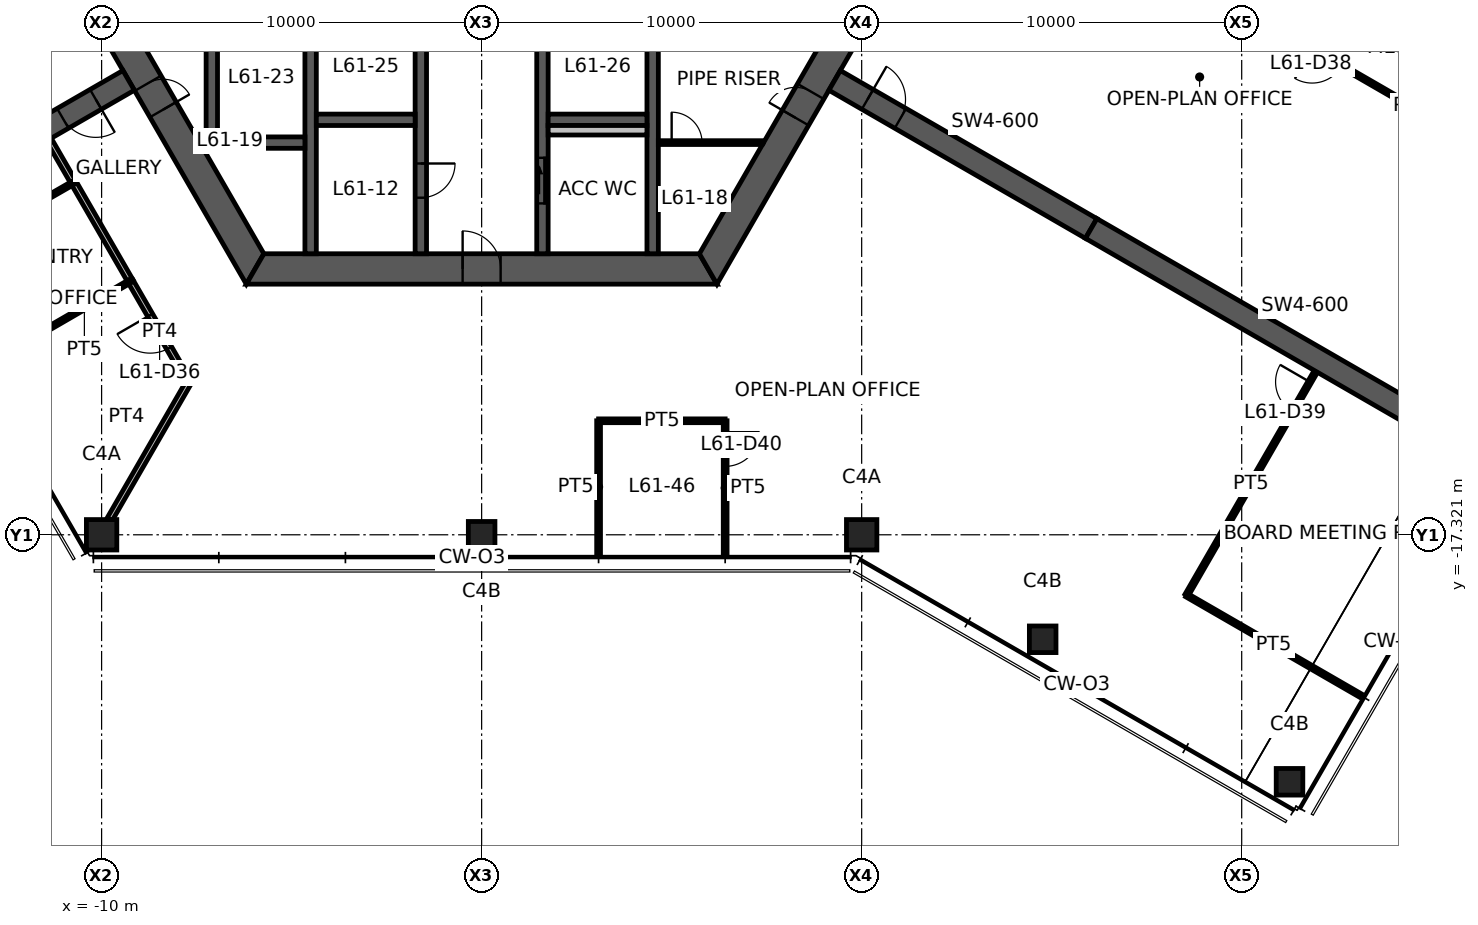
"""IFC4 building model, lengths in metres.
Left out: names, types, materials, properties, quantities, classifications, styles, units other than length and angle.
Written with IfcOpenShell. Run it as: python <this file> out.ifc"""

import sys

from ifc_helpers import new_model, si_unit, direction, frame, frame_2d, origin, origin_2d, place, context, subcontext, project, spatial, polyline, rectangle, hollow_rectangle, outline, extrude, element, fill, save


model = new_model("IFC4")
c1 = context("Model", 3, precision=1e-05, world=origin(), true_north=direction((0.0, 1.0)))
c2 = subcontext(c1, "Body", "Model", "MODEL_VIEW")
j1 = project(units=[si_unit("LENGTHUNIT", "METRE"), si_unit("PLANEANGLEUNIT", "RADIAN")], contexts=[c1])
p1 = place(None, origin())
s1 = spatial("IfcSite", under=j1, at=p1, CompositionType="ELEMENT")
p2 = place(p1, origin())
s2 = spatial("IfcBuilding", under=s1, at=p2, CompositionType="ELEMENT")
p3 = place(p2, frame((0.0, 0.0, 244.0)))
s3 = spatial("IfcBuildingStorey", under=s2, at=p3, CompositionType="ELEMENT", Elevation=244.0)
for number, where, z_axis, x_axis in (
    (1, (-10.0, -17.321, 0.0), (0.0, 0.0, 1.0), (1.0, 0.0, 0.0)),
    (2, (10.0, -17.321, 0.0), (0.0, 0.0, 1.0), (1.0, 0.0, 0.0)),
):
    element("IfcColumn", number, at=place(p3, frame(where, z_axis=z_axis, x_axis=x_axis)), inside=s3, PredefinedType="COLUMN", context=c2, shape_type="SweptSolid", body=[
        extrude(hollow_rectangle(XDim=0.8, YDim=0.8, WallThickness=0.04, at=origin_2d()), origin(), (0.0, 0.0, 1.0), 3.9),
    ])
for number, where, z_axis, x_axis in (
    (3, (0.0, -17.321, 0.0), (0.0, 0.0, 1.0), (1.0, 0.0, 0.0)),
    (4, (14.763, -20.071, 0.0), (0.0, 0.0, 1.0), (1.0, 0.0, 0.0)),
    (5, (21.258, -23.821, 0.0), (0.0, 0.0, 1.0), (1.0, 0.0, 0.0)),
):
    element("IfcColumn", number, at=place(p3, frame(where, z_axis=z_axis, x_axis=x_axis)), inside=s3, PredefinedType="COLUMN", context=c2, shape_type="SweptSolid", body=[
        extrude(hollow_rectangle(XDim=0.7, YDim=0.7, WallThickness=0.032, at=origin_2d()), origin(), (0.0, 0.0, 1.0), 3.9),
    ])
p4 = place(p3, frame((-11.922, 0.0, 0.0), z_axis=(0.0, 0.0, 1.0), x_axis=(0.500004296715, -0.866022923061, 0.0)))
e6 = element("IfcWall", 6, at=p4, inside=s3, PredefinedType="SHEAR", context=c2, shape_type="SweptSolid", body=[
    extrude(outline(polyline([(-0.231, -0.4), (6.281, -0.4), (7.081, -0.4), (12.153, -0.4), (11.691, 0.4), (7.081, 0.4), (6.281, 0.4), (0.231, 0.4), (-0.231, -0.4)])), origin(), (0.0, 0.0, 1.0), 3.9),
])
p5 = place(p4, frame((6.281, 0.0, 0.0)))
e7 = element("IfcOpeningElement", 7, at=p5, cuts=e6, PredefinedType="OPENING", context=c2, shape_type="SweptSolid", body=[
    extrude(rectangle(XDim=0.8, YDim=2.1, at=frame_2d((0.4, 1.05))), frame((0.0, 0.41, 0.0), z_axis=(0.0, -1.0, 0.0), x_axis=(1.0, 0.0, 0.0)), (0.0, 0.0, 1.0), 0.82),
])
p6 = place(p3, frame((-5.961, -10.325, 0.0), z_axis=(0.0, 0.0, 1.0), x_axis=(1.0, 0.0, 0.0)))
e8 = element("IfcWall", 8, at=p6, inside=s3, PredefinedType="SHEAR", context=c2, shape_type="SweptSolid", body=[
    extrude(outline(polyline([(-0.231, -0.4), (5.461, -0.4), (6.461, -0.4), (12.153, -0.4), (11.691, 0.4), (6.461, 0.4), (5.461, 0.4), (0.231, 0.4), (-0.231, -0.4)])), origin(), (0.0, 0.0, 1.0), 3.9),
])
p7 = place(p6, frame((5.461, 0.0, 0.0)))
e9 = element("IfcOpeningElement", 9, at=p7, cuts=e8, PredefinedType="OPENING", context=c2, shape_type="SweptSolid", body=[
    extrude(rectangle(XDim=1.0, YDim=2.1, at=frame_2d((0.5, 1.05))), frame((0.0, 0.41, 0.0), z_axis=(0.0, -1.0, 0.0), x_axis=(1.0, 0.0, 0.0)), (0.0, 0.0, 1.0), 0.82),
])
p8 = place(p3, frame((5.961, -10.325, 0.0), z_axis=(0.0, 0.0, 1.0), x_axis=(0.500004296715, 0.866022923061, 0.0)))
e10 = element("IfcWall", 10, at=p8, inside=s3, PredefinedType="SHEAR", context=c2, shape_type="SweptSolid", body=[
    extrude(outline(polyline([(-0.231, -0.4), (4.594, -0.4), (5.394, -0.4), (12.153, -0.4), (11.691, 0.4), (5.394, 0.4), (4.594, 0.4), (0.231, 0.4), (-0.231, -0.4)])), origin(), (0.0, 0.0, 1.0), 3.9),
])
p9 = place(p8, frame((4.594, 0.0, 0.0)))
e11 = element("IfcOpeningElement", 11, at=p9, cuts=e10, PredefinedType="OPENING", context=c2, shape_type="SweptSolid", body=[
    extrude(rectangle(XDim=0.8, YDim=2.1, at=frame_2d((0.4, 1.05))), frame((0.0, 0.41, 0.0), z_axis=(0.0, -1.0, 0.0), x_axis=(1.0, 0.0, 0.0)), (0.0, 0.0, 1.0), 0.82),
])
p10 = place(p3, frame((-9.288, -5.363, 0.0), z_axis=(0.0, 0.0, 1.0), x_axis=(-0.866027473358, -0.499996415376, 0.0)))
e12 = element("IfcWall", 12, at=p10, inside=s3, PredefinedType="SHEAR", context=c2, shape_type="SweptSolid", body=[
    extrude(rectangle(XDim=7.045, YDim=0.6, at=frame_2d((3.523, 0.0))), origin(), (0.0, 0.0, 1.0), 3.9),
])
p11 = place(p10, frame((1.0, 0.0, 0.0)))
e13 = element("IfcOpeningElement", 13, at=p11, cuts=e12, PredefinedType="OPENING", context=c2, shape_type="SweptSolid", body=[
    extrude(rectangle(XDim=1.0, YDim=2.1, at=frame_2d((0.5, 1.05))), frame((0.0, 0.31, 0.0), z_axis=(0.0, -1.0, 0.0), x_axis=(1.0, 0.0, 0.0)), (0.0, 0.0, 1.0), 0.62),
])
p12 = place(p3, frame((9.288, -5.363, 0.0), z_axis=(0.0, 0.0, 1.0), x_axis=(0.866031736626, -0.499989031036, 0.0)))
e14 = element("IfcWall", 14, at=p12, inside=s3, PredefinedType="SHEAR", context=c2, shape_type="SweptSolid", body=[
    extrude(rectangle(XDim=7.796, YDim=0.6, at=frame_2d((3.898, 0.0))), origin(), (0.0, 0.0, 1.0), 3.9),
])
p13 = place(p12, frame((1.0, 0.0, 0.0)))
e15 = element("IfcOpeningElement", 15, at=p13, cuts=e14, PredefinedType="OPENING", context=c2, shape_type="SweptSolid", body=[
    extrude(rectangle(XDim=1.0, YDim=2.1, at=frame_2d((0.5, 1.05))), frame((0.0, 0.31, 0.0), z_axis=(0.0, -1.0, 0.0), x_axis=(1.0, 0.0, 0.0)), (0.0, 0.0, 1.0), 0.62),
])
p14 = place(p3, frame((16.039, -9.26, 0.0), z_axis=(0.0, 0.0, 1.0), x_axis=(0.866024837091, -0.50000098154, 0.0)))
e16 = element("IfcWall", 16, at=p14, inside=s3, PredefinedType="SHEAR", context=c2, shape_type="SweptSolid", body=[
    extrude(rectangle(XDim=13.0, YDim=0.6, at=frame_2d((6.5, 0.0))), origin(), (0.0, 0.0, 1.0), 3.9),
])
p15 = place(p3, frame((-1.6, -3.75, 0.0), z_axis=(0.0, 0.0, 1.0), x_axis=(0.0, -1.0, 0.0)))
e17 = element("IfcWall", 17, at=p15, inside=s3, PredefinedType="SHEAR", context=c2, shape_type="SweptSolid", body=[
    extrude(rectangle(XDim=6.175, YDim=0.3, at=frame_2d((3.087, 0.0))), origin(), (0.0, 0.0, 1.0), 3.9),
])
p16 = place(p15, frame((3.8, 0.0, 0.0)))
e18 = element("IfcOpeningElement", 18, at=p16, cuts=e17, PredefinedType="OPENING", context=c2, shape_type="SweptSolid", body=[
    extrude(rectangle(XDim=0.9, YDim=2.1, at=frame_2d((0.45, 1.05))), frame((0.0, 0.16, 0.0), z_axis=(0.0, -1.0, 0.0), x_axis=(1.0, 0.0, 0.0)), (0.0, 0.0, 1.0), 0.32),
])
p17 = place(p3, frame((1.6, -3.75, 0.0), z_axis=(0.0, 0.0, 1.0), x_axis=(0.0, -1.0, 0.0)))
e19 = element("IfcWall", 19, at=p17, inside=s3, PredefinedType="SHEAR", context=c2, shape_type="SweptSolid", body=[
    extrude(rectangle(XDim=6.175, YDim=0.3, at=frame_2d((3.087, 0.0))), origin(), (0.0, 0.0, 1.0), 3.9),
])
p18 = place(p17, frame((3.65, 0.0, 0.0)))
e20 = element("IfcOpeningElement", 20, at=p18, cuts=e19, PredefinedType="OPENING", context=c2, shape_type="SweptSolid", body=[
    extrude(rectangle(XDim=1.2, YDim=2.1, at=frame_2d((0.6, 1.05))), frame((0.0, 0.16, 0.0), z_axis=(0.0, -1.0, 0.0), x_axis=(1.0, 0.0, 0.0)), (0.0, 0.0, 1.0), 0.32),
])
for number, where, z_axis, x_axis in (
    (21, (-4.5, -3.75, 0.0), (0.0, 0.0, 1.0), (0.0, -1.0, 0.0)),
    (22, (4.5, -3.75, 0.0), (0.0, 0.0, 1.0), (0.0, -1.0, 0.0)),
):
    element("IfcWall", number, at=place(p3, frame(where, z_axis=z_axis, x_axis=x_axis)), inside=s3, PredefinedType="SHEAR", context=c2, shape_type="SweptSolid", body=[
        extrude(rectangle(XDim=6.175, YDim=0.3, at=frame_2d((3.087, 0.0))), origin(), (0.0, 0.0, 1.0), 3.9),
    ])
for number, where, z_axis, x_axis in (
    (23, (-4.35, -6.4, 0.0), (0.0, 0.0, 1.0), (1.0, 0.0, 0.0)),
    (24, (1.75, -6.4, 0.0), (0.0, 0.0, 1.0), (1.0, 0.0, 0.0)),
    (25, (-7.25, -7.0, 0.0), (0.0, 0.0, 1.0), (1.0, 0.0, 0.0)),
):
    element("IfcWall", number, at=place(p3, frame(where, z_axis=z_axis, x_axis=x_axis)), inside=s3, PredefinedType="SHEAR", context=c2, shape_type="SweptSolid", body=[
        extrude(rectangle(XDim=2.6, YDim=0.3, at=frame_2d((1.3, 0.0))), origin(), (0.0, 0.0, 1.0), 3.9),
    ])
p19 = place(p3, frame((-7.1, -3.75, 0.0), z_axis=(0.0, 0.0, 1.0), x_axis=(0.0, -1.0, 0.0)))
e26 = element("IfcWall", 26, at=p19, inside=s3, PredefinedType="SHEAR", context=c2, shape_type="SweptSolid", body=[
    extrude(rectangle(XDim=3.1, YDim=0.3, at=frame_2d((1.55, 0.0))), origin(), (0.0, 0.0, 1.0), 3.9),
])
p20 = place(p3, frame((1.75, -6.675, 0.0), z_axis=(0.0, 0.0, 1.0), x_axis=(1.0, 0.0, 0.0)))
e27 = element("IfcWall", 27, at=p20, inside=s3, PredefinedType="PLUMBINGWALL", context=c2, shape_type="SweptSolid", body=[
    extrude(rectangle(XDim=2.6, YDim=0.25, at=frame_2d((1.3, 0.0))), origin(), (0.0, 0.0, 1.0), 3.9),
])
p21 = place(p3, frame((4.65, -7.0, 0.0), z_axis=(0.0, 0.0, 1.0), x_axis=(1.0, 0.0, 0.0)))
e28 = element("IfcWall", 28, at=p21, inside=s3, PredefinedType="PARTITIONING", context=c2, shape_type="SweptSolid", body=[
    extrude(outline(polyline([(0.0, -0.05), (0.35, -0.05), (1.15, -0.05), (2.74, -0.05), (2.769, 0.0), (2.775, 0.05), (1.15, 0.05), (0.35, 0.05), (0.0, 0.05), (0.0, -0.05)])), origin(), (0.0, 0.0, 1.0), 2.95),
])
p22 = place(p21, frame((0.35, 0.0, 0.0)))
e29 = element("IfcOpeningElement", 29, at=p22, cuts=e28, PredefinedType="OPENING", context=c2, shape_type="SweptSolid", body=[
    extrude(rectangle(XDim=0.8, YDim=2.1, at=frame_2d((0.4, 1.05))), frame((0.0, 0.06, 0.0), z_axis=(0.0, -1.0, 0.0), x_axis=(1.0, 0.0, 0.0)), (0.0, 0.0, 1.0), 0.12),
])
p23 = place(p3, frame((-9.237, -10.65, 0.0), z_axis=(0.0, 0.0, 1.0), x_axis=(-0.499977562641, 0.866038357612, 0.0)))
e30 = element("IfcWall", 30, at=p23, inside=s3, PredefinedType="PARTITIONING", context=c2, shape_type="SweptSolid", body=[
    extrude(rectangle(XDim=3.01, YDim=0.15, at=frame_2d((1.505, 0.0))), origin(), (0.0, 0.0, 1.0), 2.95),
])
p24 = place(p3, frame((-10.738, -8.052, 0.0), z_axis=(0.0, 0.0, 1.0), x_axis=(-0.500084415177, 0.865976661173, 0.0)))
e31 = element("IfcWall", 31, at=p24, inside=s3, PredefinedType="PARTITIONING", context=c2, shape_type="SweptSolid", body=[
    extrude(rectangle(XDim=1.284, YDim=0.15, at=frame_2d((0.642, 0.0))), origin(), (0.0, 0.0, 1.0), 2.95),
])
p25 = place(p3, frame((-7.705, -13.305, 0.0), z_axis=(0.0, 0.0, 1.0), x_axis=(-0.500024891708, 0.866011032073, 0.0)))
e32 = element("IfcWall", 32, at=p25, inside=s3, PredefinedType="PARTITIONING", context=c2, shape_type="SweptSolid", body=[
    extrude(rectangle(XDim=3.074, YDim=0.15, at=frame_2d((1.537, 0.0))), origin(), (0.0, 0.0, 1.0), 2.95),
])
p26 = place(p25, frame((1.037, 0.0, 0.0)))
e33 = element("IfcOpeningElement", 33, at=p26, cuts=e32, PredefinedType="OPENING", context=c2, shape_type="SweptSolid", body=[
    extrude(rectangle(XDim=1.0, YDim=2.1, at=frame_2d((0.5, 1.05))), frame((0.0, 0.085, 0.0), z_axis=(0.0, -1.0, 0.0), x_axis=(1.0, 0.0, 0.0)), (0.0, 0.0, 1.0), 0.17),
])
for number, where, z_axis, x_axis in (
    (34, (-13.165, -9.448, 0.0), (0.0, 0.0, 1.0), (0.867, 0.499, 0.0)),
    (35, (-9.242, -10.642, 0.0), (0.0, 0.0, 1.0), (-0.865, -0.501, 0.0)),
):
    element("IfcWall", number, at=place(p3, frame(where, z_axis=z_axis, x_axis=x_axis)), inside=s3, PredefinedType="PARTITIONING", context=c2, shape_type="SweptSolid", body=[
        extrude(rectangle(XDim=2.8, YDim=0.1, at=frame_2d((1.4, 0.0))), origin(), (0.0, 0.0, 1.0), 2.95),
    ])
p27 = place(p3, frame((27.325, -7.693, 0.0), z_axis=(0.0, 0.0, 1.0), x_axis=(-0.866021597574, 0.500006592492, 0.0)))
e36 = element("IfcWall", 36, at=p27, inside=s3, PredefinedType="PARTITIONING", context=c2, shape_type="SweptSolid", body=[
    extrude(rectangle(XDim=6.62, YDim=0.1, at=frame_2d((3.31, 0.0))), origin(), (0.0, 0.0, 1.0), 2.95),
])
p28 = place(p27, frame((5.42, 0.0, 0.0)))
e37 = element("IfcOpeningElement", 37, at=p28, cuts=e36, PredefinedType="OPENING", context=c2, shape_type="SweptSolid", body=[
    extrude(rectangle(XDim=0.9, YDim=2.1, at=frame_2d((0.45, 1.05))), frame((0.0, 0.06, 0.0), z_axis=(0.0, -1.0, 0.0), x_axis=(1.0, 0.0, 0.0)), (0.0, 0.0, 1.0), 0.12),
])
p29 = place(p3, frame((18.552, -18.909, 0.0), z_axis=(0.0, 0.0, 1.0), x_axis=(0.499992600721, 0.866029675718, 0.0)))
e38 = element("IfcWall", 38, at=p29, inside=s3, PredefinedType="PARTITIONING", context=c2, shape_type="SweptSolid", body=[
    extrude(rectangle(XDim=6.78, YDim=0.1, at=frame_2d((3.39, 0.0))), origin(), (0.0, 0.0, 1.0), 2.95),
])
p30 = place(p29, frame((5.58, 0.0, 0.0)))
e39 = element("IfcOpeningElement", 39, at=p30, cuts=e38, PredefinedType="OPENING", context=c2, shape_type="SweptSolid", body=[
    extrude(rectangle(XDim=0.9, YDim=2.1, at=frame_2d((0.45, 1.05))), frame((0.0, 0.06, 0.0), z_axis=(0.0, -1.0, 0.0), x_axis=(1.0, 0.0, 0.0)), (0.0, 0.0, 1.0), 0.12),
])
p31 = place(p3, frame((23.124, -21.549, 0.0), z_axis=(0.0, 0.0, 1.0), x_axis=(-0.866009249374, 0.500027979216, 0.0)))
e40 = element("IfcWall", 40, at=p31, inside=s3, PredefinedType="PARTITIONING", context=c2, shape_type="SweptSolid", body=[
    extrude(rectangle(XDim=5.28, YDim=0.1, at=frame_2d((2.64, 0.0))), origin(), (0.0, 0.0, 1.0), 2.95),
])
p32 = place(p3, frame((3.077, -17.801, 0.0), z_axis=(0.0, 0.0, 1.0), x_axis=(0.0, 1.0, 0.0)))
e41 = element("IfcWall", 41, at=p32, inside=s3, PredefinedType="PARTITIONING", context=c2, shape_type="SweptSolid", body=[
    extrude(rectangle(XDim=3.48, YDim=0.1, at=frame_2d((1.74, 0.0))), origin(), (0.0, 0.0, 1.0), 2.95),
])
p33 = place(p3, frame((3.077, -14.321, 0.0), z_axis=(0.0, 0.0, 1.0), x_axis=(1.0, 0.0, 0.0)))
e42 = element("IfcWall", 42, at=p33, inside=s3, PredefinedType="PARTITIONING", context=c2, shape_type="SweptSolid", body=[
    extrude(rectangle(XDim=3.331, YDim=0.1, at=frame_2d((1.666, 0.0))), origin(), (0.0, 0.0, 1.0), 2.95),
])
p34 = place(p3, frame((6.408, -14.321, 0.0), z_axis=(0.0, 0.0, 1.0), x_axis=(0.0, -1.0, 0.0)))
e43 = element("IfcWall", 43, at=p34, inside=s3, PredefinedType="PARTITIONING", context=c2, shape_type="SweptSolid", body=[
    extrude(rectangle(XDim=3.535, YDim=0.1, at=frame_2d((1.768, 0.0))), origin(), (0.0, 0.0, 1.0), 2.95),
])
p35 = place(p34, frame((0.3, 0.0, 0.0)))
e44 = element("IfcOpeningElement", 44, at=p35, cuts=e43, PredefinedType="OPENING", context=c2, shape_type="SweptSolid", body=[
    extrude(rectangle(XDim=0.9, YDim=2.1, at=frame_2d((0.45, 1.05))), frame((0.0, 0.06, 0.0), z_axis=(0.0, -1.0, 0.0), x_axis=(1.0, 0.0, 0.0)), (0.0, 0.0, 1.0), 0.12),
])
p36 = place(p3, frame((-7.705, -13.305, 0.0), z_axis=(0.0, 0.0, 1.0), x_axis=(-0.500036655653, -0.866004239599, 0.0)))
e45 = element("IfcWall", 45, at=p36, inside=s3, PredefinedType="PARTITIONING", context=c2, shape_type="SweptSolid", body=[
    extrude(rectangle(XDim=4.17, YDim=0.15, at=frame_2d((2.085, 0.0))), origin(), (0.0, 0.0, 1.0), 2.95),
])
p37 = place(p7, origin())
e46 = element("IfcDoor", 46, at=p37, inside=s3, OperationType="SINGLE_SWING_LEFT", PredefinedType="DOOR", context=c2, shape_type="SweptSolid", body=[
    extrude(rectangle(XDim=1.0, YDim=2.1, at=frame_2d((0.5, 1.05))), frame((0.0, 0.025, 0.0), z_axis=(0.0, -1.0, 0.0), x_axis=(1.0, 0.0, 0.0)), (0.0, 0.0, 1.0), 0.05),
])
fill(e9, e46)
p38 = place(p9, origin())
e47 = element("IfcDoor", 47, at=p38, inside=s3, OperationType="SINGLE_SWING_LEFT", PredefinedType="DOOR", context=c2, shape_type="SweptSolid", body=[
    extrude(rectangle(XDim=0.8, YDim=2.1, at=frame_2d((0.4, 1.05))), frame((0.0, 0.025, 0.0), z_axis=(0.0, -1.0, 0.0), x_axis=(1.0, 0.0, 0.0)), (0.0, 0.0, 1.0), 0.05),
])
fill(e11, e47)
p39 = place(p5, origin())
e48 = element("IfcDoor", 48, at=p39, inside=s3, OperationType="SINGLE_SWING_RIGHT", PredefinedType="DOOR", context=c2, shape_type="SweptSolid", body=[
    extrude(rectangle(XDim=0.8, YDim=2.1, at=frame_2d((0.4, 1.05))), frame((0.0, 0.025, 0.0), z_axis=(0.0, -1.0, 0.0), x_axis=(1.0, 0.0, 0.0)), (0.0, 0.0, 1.0), 0.05),
])
fill(e7, e48)
p40 = place(p18, origin())
e49 = element("IfcDoor", 49, at=p40, inside=s3, OperationType="SLIDING_TO_LEFT", PredefinedType="DOOR", context=c2, shape_type="SweptSolid", body=[
    extrude(rectangle(XDim=1.2, YDim=2.1, at=frame_2d((0.6, 1.05))), frame((0.0, 0.025, 0.0), z_axis=(0.0, -1.0, 0.0), x_axis=(1.0, 0.0, 0.0)), (0.0, 0.0, 1.0), 0.05),
])
fill(e20, e49)
p41 = place(p16, origin())
e50 = element("IfcDoor", 50, at=p41, inside=s3, OperationType="SINGLE_SWING_LEFT", PredefinedType="DOOR", context=c2, shape_type="SweptSolid", body=[
    extrude(rectangle(XDim=0.9, YDim=2.1, at=frame_2d((0.45, 1.05))), frame((0.0, 0.025, 0.0), z_axis=(0.0, -1.0, 0.0), x_axis=(1.0, 0.0, 0.0)), (0.0, 0.0, 1.0), 0.05),
])
fill(e18, e50)
p42 = place(p11, origin())
e51 = element("IfcDoor", 51, at=p42, inside=s3, OperationType="SINGLE_SWING_LEFT", PredefinedType="DOOR", context=c2, shape_type="SweptSolid", body=[
    extrude(rectangle(XDim=1.0, YDim=2.1, at=frame_2d((0.5, 1.05))), frame((0.0, 0.025, 0.0), z_axis=(0.0, -1.0, 0.0), x_axis=(1.0, 0.0, 0.0)), (0.0, 0.0, 1.0), 0.05),
])
fill(e13, e51)
p43 = place(p13, origin())
e52 = element("IfcDoor", 52, at=p43, inside=s3, OperationType="SINGLE_SWING_LEFT", PredefinedType="DOOR", context=c2, shape_type="SweptSolid", body=[
    extrude(rectangle(XDim=1.0, YDim=2.1, at=frame_2d((0.5, 1.05))), frame((0.0, 0.025, 0.0), z_axis=(0.0, -1.0, 0.0), x_axis=(1.0, 0.0, 0.0)), (0.0, 0.0, 1.0), 0.05),
])
fill(e15, e52)
p44 = place(p22, origin())
e53 = element("IfcDoor", 53, at=p44, inside=s3, OperationType="SINGLE_SWING_LEFT", PredefinedType="DOOR", context=c2, shape_type="SweptSolid", body=[
    extrude(rectangle(XDim=0.8, YDim=2.1, at=frame_2d((0.4, 1.05))), frame((0.0, 0.025, 0.0), z_axis=(0.0, -1.0, 0.0), x_axis=(1.0, 0.0, 0.0)), (0.0, 0.0, 1.0), 0.05),
])
fill(e29, e53)
p45 = place(p26, origin())
e54 = element("IfcDoor", 54, at=p45, inside=s3, OperationType="SINGLE_SWING_RIGHT", PredefinedType="DOOR", context=c2, shape_type="SweptSolid", body=[
    extrude(rectangle(XDim=1.0, YDim=2.1, at=frame_2d((0.5, 1.05))), frame((0.0, 0.025, 0.0), z_axis=(0.0, -1.0, 0.0), x_axis=(1.0, 0.0, 0.0)), (0.0, 0.0, 1.0), 0.05),
])
fill(e33, e54)
p46 = place(p28, origin())
e55 = element("IfcDoor", 55, at=p46, inside=s3, OperationType="SINGLE_SWING_RIGHT", PredefinedType="DOOR", context=c2, shape_type="SweptSolid", body=[
    extrude(rectangle(XDim=0.9, YDim=2.1, at=frame_2d((0.45, 1.05))), frame((0.0, 0.025, 0.0), z_axis=(0.0, -1.0, 0.0), x_axis=(1.0, 0.0, 0.0)), (0.0, 0.0, 1.0), 0.05),
])
fill(e37, e55)
p47 = place(p30, origin())
e56 = element("IfcDoor", 56, at=p47, inside=s3, OperationType="SINGLE_SWING_RIGHT", PredefinedType="DOOR", context=c2, shape_type="SweptSolid", body=[
    extrude(rectangle(XDim=0.9, YDim=2.1, at=frame_2d((0.45, 1.05))), frame((0.0, 0.025, 0.0), z_axis=(0.0, -1.0, 0.0), x_axis=(1.0, 0.0, 0.0)), (0.0, 0.0, 1.0), 0.05),
])
fill(e39, e56)
p48 = place(p35, origin())
e57 = element("IfcDoor", 57, at=p48, inside=s3, OperationType="SINGLE_SWING_LEFT", PredefinedType="DOOR", context=c2, shape_type="SweptSolid", body=[
    extrude(rectangle(XDim=0.9, YDim=2.1, at=frame_2d((0.45, 1.05))), frame((0.0, 0.025, 0.0), z_axis=(0.0, -1.0, 0.0), x_axis=(1.0, 0.0, 0.0)), (0.0, 0.0, 1.0), 0.05),
])
fill(e44, e57)
save(model, sys.argv[1])
